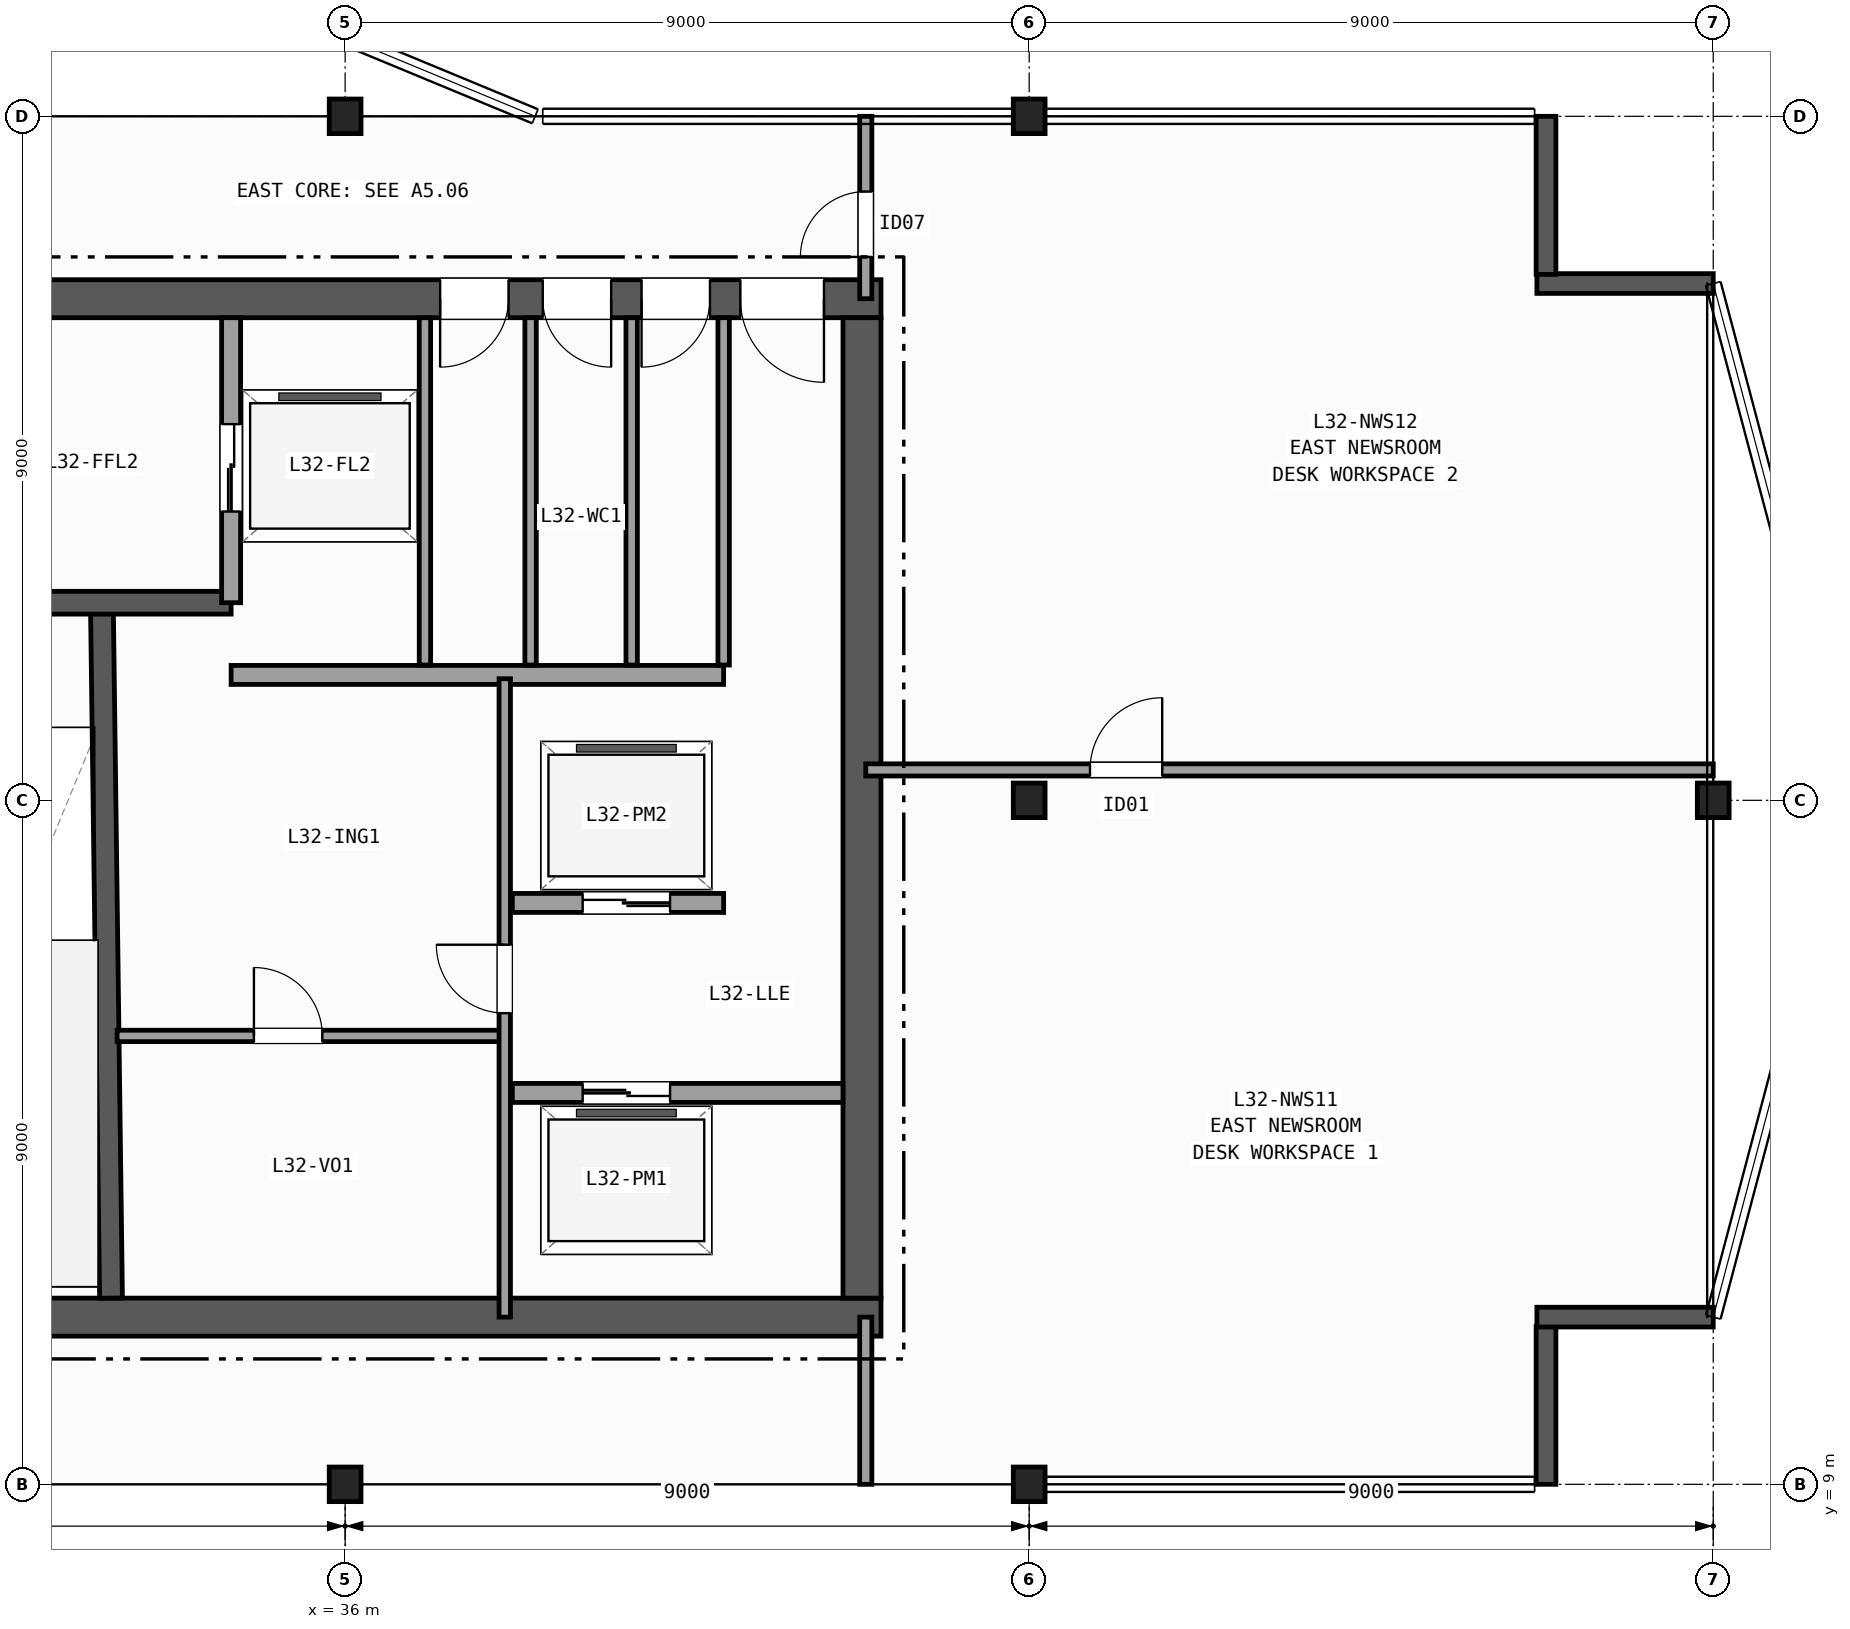
"""IFC4 building model, lengths in metres.
Left out: names, types, materials, properties, quantities, classifications, styles, units other than length and angle.
Written with IfcOpenShell. Run it as: python <this file> out.ifc"""

import sys

from ifc_helpers import new_model, si_unit, direction, frame, frame_2d, origin, origin_2d, place, context, subcontext, project, spatial, rectangle, i_section, extrude, element, fill, save


model = new_model("IFC4")
c1 = context("Model", 3, precision=1e-05, world=origin(), true_north=direction((0.0, 1.0)))
c2 = subcontext(c1, "Body", "Model", "MODEL_VIEW")
j1 = project(units=[si_unit("LENGTHUNIT", "METRE"), si_unit("PLANEANGLEUNIT", "RADIAN")], contexts=[c1])
p1 = place(None, origin())
s1 = spatial("IfcSite", under=j1, at=p1, CompositionType="ELEMENT")
p2 = place(p1, origin())
s2 = spatial("IfcBuilding", under=s1, at=p2, CompositionType="ELEMENT")
p3 = place(p2, frame((0.0, 0.0, 132.2)))
s3 = spatial("IfcBuildingStorey", under=s2, at=p3, CompositionType="ELEMENT", Elevation=132.2)
for number, where, z_axis, x_axis in (
    (1, (36.0, 9.0, 0.0), (0.0, 0.0, 1.0), (1.0, 0.0, 0.0)),
    (2, (36.0, 27.0, 0.0), (0.0, 0.0, 1.0), (1.0, 0.0, 0.0)),
    (3, (45.0, 9.0, 0.0), (0.0, 0.0, 1.0), (1.0, 0.0, 0.0)),
    (4, (45.0, 18.0, 0.0), (0.0, 0.0, 1.0), (1.0, 0.0, 0.0)),
    (5, (45.0, 27.0, 0.0), (0.0, 0.0, 1.0), (1.0, 0.0, 0.0)),
    (6, (54.0, 18.0, 0.0), (0.0, 0.0, 1.0), (1.0, 0.0, 0.0)),
):
    element("IfcColumn", number, at=place(p3, frame(where, z_axis=z_axis, x_axis=x_axis)), inside=s3, PredefinedType="COLUMN", context=c2, shape_type="SweptSolid", body=[
        extrude(i_section(OverallWidth=0.418, OverallDepth=0.455, WebThickness=0.042, FlangeThickness=0.068, FilletRadius=0.015, at=origin_2d()), origin(), (0.0, 0.0, 1.0), 3.7),
    ])
p4 = place(p3, frame((51.8, 9.0, 0.0), z_axis=(0.0, 0.0, 1.0), x_axis=(0.0, 1.0, 0.0)))
e7 = element("IfcWall", 7, at=p4, inside=s3, PredefinedType="SOLIDWALL", context=c2, shape_type="SweptSolid", body=[
    extrude(rectangle(XDim=2.08, YDim=0.26, at=frame_2d((1.04, 0.0))), origin(), (0.0, 0.0, 1.0), 3.42),
])
for number, where, z_axis, x_axis in (
    (8, (51.68, 11.2, 0.0), (0.0, 0.0, 1.0), (1.0, 0.0, 0.0)),
    (9, (54.0, 24.8, 0.0), (0.0, 0.0, 1.0), (-1.0, 0.0, 0.0)),
):
    element("IfcWall", number, at=place(p3, frame(where, z_axis=z_axis, x_axis=x_axis)), inside=s3, PredefinedType="SOLIDWALL", context=c2, shape_type="SweptSolid", body=[
        extrude(rectangle(XDim=2.32, YDim=0.26, at=frame_2d((1.16, 0.0))), origin(), (0.0, 0.0, 1.0), 3.42),
    ])
p5 = place(p3, frame((51.8, 24.92, 0.0), z_axis=(0.0, 0.0, 1.0), x_axis=(0.0, 1.0, 0.0)))
e10 = element("IfcWall", 10, at=p5, inside=s3, PredefinedType="SOLIDWALL", context=c2, shape_type="SweptSolid", body=[
    extrude(rectangle(XDim=2.08, YDim=0.26, at=frame_2d((1.04, 0.0))), origin(), (0.0, 0.0, 1.0), 3.42),
])
p6 = place(p3, frame((29.15, 11.2, 0.0), z_axis=(0.0, 0.0, 1.0), x_axis=(1.0, 0.0, 0.0)))
e11 = element("IfcWall", 11, at=p6, inside=s3, PredefinedType="SHEAR", context=c2, shape_type="SweptSolid", body=[
    extrude(rectangle(XDim=13.9, YDim=0.5, at=frame_2d((6.95, 0.0))), origin(), (0.0, 0.0, 1.0), 3.42),
])
p7 = place(p3, frame((43.05, 24.6, 0.0), z_axis=(0.0, 0.0, 1.0), x_axis=(-1.0, 0.0, 0.0)))
e12 = element("IfcWall", 12, at=p7, inside=s3, PredefinedType="SHEAR", context=c2, shape_type="SweptSolid", body=[
    extrude(rectangle(XDim=13.9, YDim=0.5, at=frame_2d((6.95, 0.0))), origin(), (0.0, 0.0, 1.0), 3.42),
])
p8 = place(p7, frame((0.75, 0.0, 0.0)))
e13 = element("IfcOpeningElement", 13, at=p8, cuts=e12, PredefinedType="OPENING", context=c2, shape_type="SweptSolid", body=[
    extrude(rectangle(XDim=1.1, YDim=2.15, at=frame_2d((0.55, 1.075))), frame((0.0, 0.26, 0.0), z_axis=(0.0, -1.0, 0.0), x_axis=(1.0, 0.0, 0.0)), (0.0, 0.0, 1.0), 0.52),
])
p9 = place(p7, frame((2.25, 0.0, 0.0)))
e14 = element("IfcOpeningElement", 14, at=p9, cuts=e12, PredefinedType="OPENING", context=c2, shape_type="SweptSolid", body=[
    extrude(rectangle(XDim=0.9, YDim=2.1, at=frame_2d((0.45, 1.05))), frame((0.0, 0.26, 0.0), z_axis=(0.0, -1.0, 0.0), x_axis=(1.0, 0.0, 0.0)), (0.0, 0.0, 1.0), 0.52),
])
p10 = place(p7, frame((3.55, 0.0, 0.0)))
e15 = element("IfcOpeningElement", 15, at=p10, cuts=e12, PredefinedType="OPENING", context=c2, shape_type="SweptSolid", body=[
    extrude(rectangle(XDim=0.9, YDim=2.1, at=frame_2d((0.45, 1.05))), frame((0.0, 0.26, 0.0), z_axis=(0.0, -1.0, 0.0), x_axis=(1.0, 0.0, 0.0)), (0.0, 0.0, 1.0), 0.52),
])
p11 = place(p7, frame((4.9, 0.0, 0.0)))
e16 = element("IfcOpeningElement", 16, at=p11, cuts=e12, PredefinedType="OPENING", context=c2, shape_type="SweptSolid", body=[
    extrude(rectangle(XDim=0.9, YDim=2.1, at=frame_2d((0.45, 1.05))), frame((0.0, 0.26, 0.0), z_axis=(0.0, -1.0, 0.0), x_axis=(1.0, 0.0, 0.0)), (0.0, 0.0, 1.0), 0.52),
])
p12 = place(p3, frame((42.8, 11.45, 0.0), z_axis=(0.0, 0.0, 1.0), x_axis=(0.0, 1.0, 0.0)))
e17 = element("IfcWall", 17, at=p12, inside=s3, PredefinedType="SHEAR", context=c2, shape_type="SweptSolid", body=[
    extrude(rectangle(XDim=12.9, YDim=0.5, at=frame_2d((6.45, 0.0))), origin(), (0.0, 0.0, 1.0), 3.42),
])
p13 = place(p3, frame((32.92, 11.45, 0.0), z_axis=(0.0, 0.0, 1.0), x_axis=(-0.013171578211, 0.999913251001, 0.0)))
e18 = element("IfcWall", 18, at=p13, inside=s3, PredefinedType="SHEAR", context=c2, shape_type="SweptSolid", body=[
    extrude(rectangle(XDim=9.101, YDim=0.3, at=frame_2d((4.55, 0.0))), origin(), (0.0, 0.0, 1.0), 3.42),
])
p14 = place(p3, frame((34.5, 20.6, 0.0), z_axis=(0.0, 0.0, 1.0), x_axis=(-1.0, 0.0, 0.0)))
e19 = element("IfcWall", 19, at=p14, inside=s3, PredefinedType="SHEAR", context=c2, shape_type="SweptSolid", body=[
    extrude(rectangle(XDim=4.85, YDim=0.3, at=frame_2d((2.425, 0.0))), origin(), (0.0, 0.0, 1.0), 3.42),
])
p15 = place(p14, frame((2.7, 0.0, 0.0)))
e20 = element("IfcOpeningElement", 20, at=p15, cuts=e19, PredefinedType="OPENING", context=c2, shape_type="SweptSolid", body=[
    extrude(rectangle(XDim=1.2, YDim=2.15, at=frame_2d((0.6, 1.075))), frame((0.0, 0.16, 0.0), z_axis=(0.0, -1.0, 0.0), x_axis=(1.0, 0.0, 0.0)), (0.0, 0.0, 1.0), 0.32),
])
p16 = place(p3, frame((34.5, 20.6, 0.0), z_axis=(0.0, 0.0, 1.0), x_axis=(0.0, 1.0, 0.0)))
e21 = element("IfcWall", 21, at=p16, inside=s3, PredefinedType="PARTITIONING", context=c2, shape_type="SweptSolid", body=[
    extrude(rectangle(XDim=3.75, YDim=0.25, at=frame_2d((1.875, 0.0))), origin(), (0.0, 0.0, 1.0), 3.42),
])
p17 = place(p16, frame((1.2, 0.0, 0.0)))
e22 = element("IfcOpeningElement", 22, at=p17, cuts=e21, PredefinedType="OPENING", context=c2, shape_type="SweptSolid", body=[
    extrude(rectangle(XDim=1.15, YDim=2.15, at=frame_2d((0.575, 1.075))), frame((0.0, 0.135, 0.0), z_axis=(0.0, -1.0, 0.0), x_axis=(1.0, 0.0, 0.0)), (0.0, 0.0, 1.0), 0.27),
])
p18 = place(p3, frame((34.5, 19.65, 0.0), z_axis=(0.0, 0.0, 1.0), x_axis=(1.0, 0.0, 0.0)))
e23 = element("IfcWall", 23, at=p18, inside=s3, PredefinedType="PARTITIONING", context=c2, shape_type="SweptSolid", body=[
    extrude(rectangle(XDim=6.48, YDim=0.25, at=frame_2d((3.24, 0.0))), origin(), (0.0, 0.0, 1.0), 3.42),
])
p19 = place(p3, frame((38.2, 14.15, 0.0), z_axis=(0.0, 0.0, 1.0), x_axis=(1.0, 0.0, 0.0)))
e24 = element("IfcWall", 24, at=p19, inside=s3, PredefinedType="PARTITIONING", context=c2, shape_type="SweptSolid", body=[
    extrude(rectangle(XDim=4.35, YDim=0.25, at=frame_2d((2.175, 0.0))), origin(), (0.0, 0.0, 1.0), 3.42),
])
p20 = place(p19, frame((0.925, 0.0, 0.0)))
e25 = element("IfcOpeningElement", 25, at=p20, cuts=e24, PredefinedType="OPENING", context=c2, shape_type="SweptSolid", body=[
    extrude(rectangle(XDim=1.15, YDim=2.15, at=frame_2d((0.575, 1.075))), frame((0.0, 0.135, 0.0), z_axis=(0.0, -1.0, 0.0), x_axis=(1.0, 0.0, 0.0)), (0.0, 0.0, 1.0), 0.27),
])
p21 = place(p3, frame((40.98, 16.65, 0.0), z_axis=(0.0, 0.0, 1.0), x_axis=(-1.0, 0.0, 0.0)))
e26 = element("IfcWall", 26, at=p21, inside=s3, PredefinedType="PARTITIONING", context=c2, shape_type="SweptSolid", body=[
    extrude(rectangle(XDim=2.78, YDim=0.25, at=frame_2d((1.39, 0.0))), origin(), (0.0, 0.0, 1.0), 3.42),
])
p22 = place(p21, frame((0.705, 0.0, 0.0)))
e27 = element("IfcOpeningElement", 27, at=p22, cuts=e26, PredefinedType="OPENING", context=c2, shape_type="SweptSolid", body=[
    extrude(rectangle(XDim=1.15, YDim=2.15, at=frame_2d((0.575, 1.075))), frame((0.0, 0.135, 0.0), z_axis=(0.0, -1.0, 0.0), x_axis=(1.0, 0.0, 0.0)), (0.0, 0.0, 1.0), 0.27),
])
p23 = place(p3, frame((33.0, 14.9, 0.0), z_axis=(0.0, 0.0, 1.0), x_axis=(1.0, 0.0, 0.0)))
e28 = element("IfcWall", 28, at=p23, inside=s3, PredefinedType="PARTITIONING", context=c2, shape_type="SweptSolid", body=[
    extrude(rectangle(XDim=5.1, YDim=0.15, at=frame_2d((2.55, 0.0))), origin(), (0.0, 0.0, 1.0), 3.42),
])
p24 = place(p23, frame((1.8, 0.0, 0.0)))
e29 = element("IfcOpeningElement", 29, at=p24, cuts=e28, PredefinedType="OPENING", context=c2, shape_type="SweptSolid", body=[
    extrude(rectangle(XDim=0.9, YDim=2.1, at=frame_2d((0.45, 1.05))), frame((0.0, 0.085, 0.0), z_axis=(0.0, -1.0, 0.0), x_axis=(1.0, 0.0, 0.0)), (0.0, 0.0, 1.0), 0.17),
])
p25 = place(p3, frame((38.1, 11.2, 0.0), z_axis=(0.0, 0.0, 1.0), x_axis=(0.0, 1.0, 0.0)))
e30 = element("IfcWall", 30, at=p25, inside=s3, PredefinedType="PARTITIONING", context=c2, shape_type="SweptSolid", body=[
    extrude(rectangle(XDim=8.4, YDim=0.15, at=frame_2d((4.2, 0.0))), origin(), (0.0, 0.0, 1.0), 3.42),
])
p26 = place(p25, frame((4.0, 0.0, 0.0)))
e31 = element("IfcOpeningElement", 31, at=p26, cuts=e30, PredefinedType="OPENING", context=c2, shape_type="SweptSolid", body=[
    extrude(rectangle(XDim=0.9, YDim=2.1, at=frame_2d((0.45, 1.05))), frame((0.0, 0.085, 0.0), z_axis=(0.0, -1.0, 0.0), x_axis=(1.0, 0.0, 0.0)), (0.0, 0.0, 1.0), 0.17),
])
for number, where, z_axis, x_axis in (
    (32, (37.05, 19.78, 0.0), (0.0, 0.0, 1.0), (0.0, 1.0, 0.0)),
    (33, (38.44, 19.78, 0.0), (0.0, 0.0, 1.0), (0.0, 1.0, 0.0)),
    (34, (39.77, 19.78, 0.0), (0.0, 0.0, 1.0), (0.0, 1.0, 0.0)),
    (35, (40.98, 19.78, 0.0), (0.0, 0.0, 1.0), (0.0, 1.0, 0.0)),
):
    element("IfcWall", number, at=place(p3, frame(where, z_axis=z_axis, x_axis=x_axis)), inside=s3, PredefinedType="PARTITIONING", context=c2, shape_type="SweptSolid", body=[
        extrude(rectangle(XDim=4.57, YDim=0.15, at=frame_2d((2.285, 0.0))), origin(), (0.0, 0.0, 1.0), 3.42),
    ])
p27 = place(p3, frame((42.85, 9.0, 0.0), z_axis=(0.0, 0.0, 1.0), x_axis=(0.0, 1.0, 0.0)))
e36 = element("IfcWall", 36, at=p27, inside=s3, PredefinedType="PARTITIONING", context=c2, shape_type="SweptSolid", body=[
    extrude(rectangle(XDim=2.2, YDim=0.16, at=frame_2d((1.1, 0.0))), origin(), (0.0, 0.0, 1.0), 2.634),
])
p28 = place(p3, frame((42.85, 24.6, 0.0), z_axis=(0.0, 0.0, 1.0), x_axis=(0.0, 1.0, 0.0)))
e37 = element("IfcWall", 37, at=p28, inside=s3, PredefinedType="PARTITIONING", context=c2, shape_type="SweptSolid", body=[
    extrude(rectangle(XDim=2.4, YDim=0.16, at=frame_2d((1.2, 0.0))), origin(), (0.0, 0.0, 1.0), 2.634),
])
p29 = place(p28, frame((0.55, 0.0, 0.0)))
e38 = element("IfcOpeningElement", 38, at=p29, cuts=e37, PredefinedType="OPENING", context=c2, shape_type="SweptSolid", body=[
    extrude(rectangle(XDim=0.86, YDim=2.05, at=frame_2d((0.43, 1.025))), frame((0.0, 0.09, 0.0), z_axis=(0.0, -1.0, 0.0), x_axis=(1.0, 0.0, 0.0)), (0.0, 0.0, 1.0), 0.18),
])
p30 = place(p3, frame((42.85, 18.4, 0.0), z_axis=(0.0, 0.0, 1.0), x_axis=(1.0, 0.0, 0.0)))
e39 = element("IfcWall", 39, at=p30, inside=s3, PredefinedType="PARTITIONING", context=c2, shape_type="SweptSolid", body=[
    extrude(rectangle(XDim=11.15, YDim=0.16, at=frame_2d((5.575, 0.0))), origin(), (0.0, 0.0, 1.0), 3.42),
])
p31 = place(p30, frame((2.95, 0.0, 0.0)))
e40 = element("IfcOpeningElement", 40, at=p31, cuts=e39, PredefinedType="OPENING", context=c2, shape_type="SweptSolid", body=[
    extrude(rectangle(XDim=0.95, YDim=2.1, at=frame_2d((0.475, 1.05))), frame((0.0, 0.09, 0.0), z_axis=(0.0, -1.0, 0.0), x_axis=(1.0, 0.0, 0.0)), (0.0, 0.0, 1.0), 0.18),
])
p32 = place(p8, origin())
e41 = element("IfcDoor", 41, at=p32, inside=s3, OperationType="SINGLE_SWING_LEFT", PredefinedType="DOOR", context=c2, shape_type="SweptSolid", body=[
    extrude(rectangle(XDim=1.1, YDim=2.15, at=frame_2d((0.55, 1.075))), frame((0.0, 0.025, 0.0), z_axis=(0.0, -1.0, 0.0), x_axis=(1.0, 0.0, 0.0)), (0.0, 0.0, 1.0), 0.05),
])
fill(e13, e41)
p33 = place(p9, origin())
e42 = element("IfcDoor", 42, at=p33, inside=s3, OperationType="SINGLE_SWING_RIGHT", PredefinedType="DOOR", context=c2, shape_type="SweptSolid", body=[
    extrude(rectangle(XDim=0.9, YDim=2.1, at=frame_2d((0.45, 1.05))), frame((0.0, 0.025, 0.0), z_axis=(0.0, -1.0, 0.0), x_axis=(1.0, 0.0, 0.0)), (0.0, 0.0, 1.0), 0.05),
])
fill(e14, e42)
p34 = place(p10, origin())
e43 = element("IfcDoor", 43, at=p34, inside=s3, OperationType="SINGLE_SWING_LEFT", PredefinedType="DOOR", context=c2, shape_type="SweptSolid", body=[
    extrude(rectangle(XDim=0.9, YDim=2.1, at=frame_2d((0.45, 1.05))), frame((0.0, 0.025, 0.0), z_axis=(0.0, -1.0, 0.0), x_axis=(1.0, 0.0, 0.0)), (0.0, 0.0, 1.0), 0.05),
])
fill(e15, e43)
p35 = place(p11, origin())
e44 = element("IfcDoor", 44, at=p35, inside=s3, OperationType="SINGLE_SWING_RIGHT", PredefinedType="DOOR", context=c2, shape_type="SweptSolid", body=[
    extrude(rectangle(XDim=0.9, YDim=2.1, at=frame_2d((0.45, 1.05))), frame((0.0, 0.025, 0.0), z_axis=(0.0, -1.0, 0.0), x_axis=(1.0, 0.0, 0.0)), (0.0, 0.0, 1.0), 0.05),
])
fill(e16, e44)
p36 = place(p17, origin())
e45 = element("IfcDoor", 45, at=p36, inside=s3, OperationType="DOUBLE_DOOR_SLIDING", PredefinedType="DOOR", context=c2, shape_type="SweptSolid", body=[
    extrude(rectangle(XDim=1.15, YDim=2.15, at=frame_2d((0.575, 1.075))), frame((0.0, 0.025, 0.0), z_axis=(0.0, -1.0, 0.0), x_axis=(1.0, 0.0, 0.0)), (0.0, 0.0, 1.0), 0.05),
])
fill(e22, e45)
p37 = place(p20, origin())
e46 = element("IfcDoor", 46, at=p37, inside=s3, OperationType="DOUBLE_DOOR_SLIDING", PredefinedType="DOOR", context=c2, shape_type="SweptSolid", body=[
    extrude(rectangle(XDim=1.15, YDim=2.15, at=frame_2d((0.575, 1.075))), frame((0.0, 0.025, 0.0), z_axis=(0.0, -1.0, 0.0), x_axis=(1.0, 0.0, 0.0)), (0.0, 0.0, 1.0), 0.05),
])
fill(e25, e46)
p38 = place(p22, origin())
e47 = element("IfcDoor", 47, at=p38, inside=s3, OperationType="DOUBLE_DOOR_SLIDING", PredefinedType="DOOR", context=c2, shape_type="SweptSolid", body=[
    extrude(rectangle(XDim=1.15, YDim=2.15, at=frame_2d((0.575, 1.075))), frame((0.0, 0.025, 0.0), z_axis=(0.0, -1.0, 0.0), x_axis=(1.0, 0.0, 0.0)), (0.0, 0.0, 1.0), 0.05),
])
fill(e27, e47)
p39 = place(p26, origin())
e48 = element("IfcDoor", 48, at=p39, inside=s3, OperationType="SINGLE_SWING_RIGHT", PredefinedType="DOOR", context=c2, shape_type="SweptSolid", body=[
    extrude(rectangle(XDim=0.9, YDim=2.1, at=frame_2d((0.45, 1.05))), frame((0.0, 0.025, 0.0), z_axis=(0.0, -1.0, 0.0), x_axis=(1.0, 0.0, 0.0)), (0.0, 0.0, 1.0), 0.05),
])
fill(e31, e48)
p40 = place(p24, origin())
e49 = element("IfcDoor", 49, at=p40, inside=s3, OperationType="SINGLE_SWING_LEFT", PredefinedType="DOOR", context=c2, shape_type="SweptSolid", body=[
    extrude(rectangle(XDim=0.9, YDim=2.1, at=frame_2d((0.45, 1.05))), frame((0.0, 0.025, 0.0), z_axis=(0.0, -1.0, 0.0), x_axis=(1.0, 0.0, 0.0)), (0.0, 0.0, 1.0), 0.05),
])
fill(e29, e49)
p41 = place(p29, origin())
e50 = element("IfcDoor", 50, at=p41, inside=s3, OperationType="SINGLE_SWING_LEFT", PredefinedType="DOOR", context=c2, shape_type="SweptSolid", body=[
    extrude(rectangle(XDim=0.86, YDim=2.05, at=frame_2d((0.43, 1.025))), frame((0.0, 0.025, 0.0), z_axis=(0.0, -1.0, 0.0), x_axis=(1.0, 0.0, 0.0)), (0.0, 0.0, 1.0), 0.05),
])
fill(e38, e50)
p42 = place(p31, origin())
e51 = element("IfcDoor", 51, at=p42, inside=s3, OperationType="SINGLE_SWING_RIGHT", PredefinedType="DOOR", context=c2, shape_type="SweptSolid", body=[
    extrude(rectangle(XDim=0.95, YDim=2.1, at=frame_2d((0.475, 1.05))), frame((0.0, 0.025, 0.0), z_axis=(0.0, -1.0, 0.0), x_axis=(1.0, 0.0, 0.0)), (0.0, 0.0, 1.0), 0.05),
])
fill(e40, e51)
save(model, sys.argv[1])
